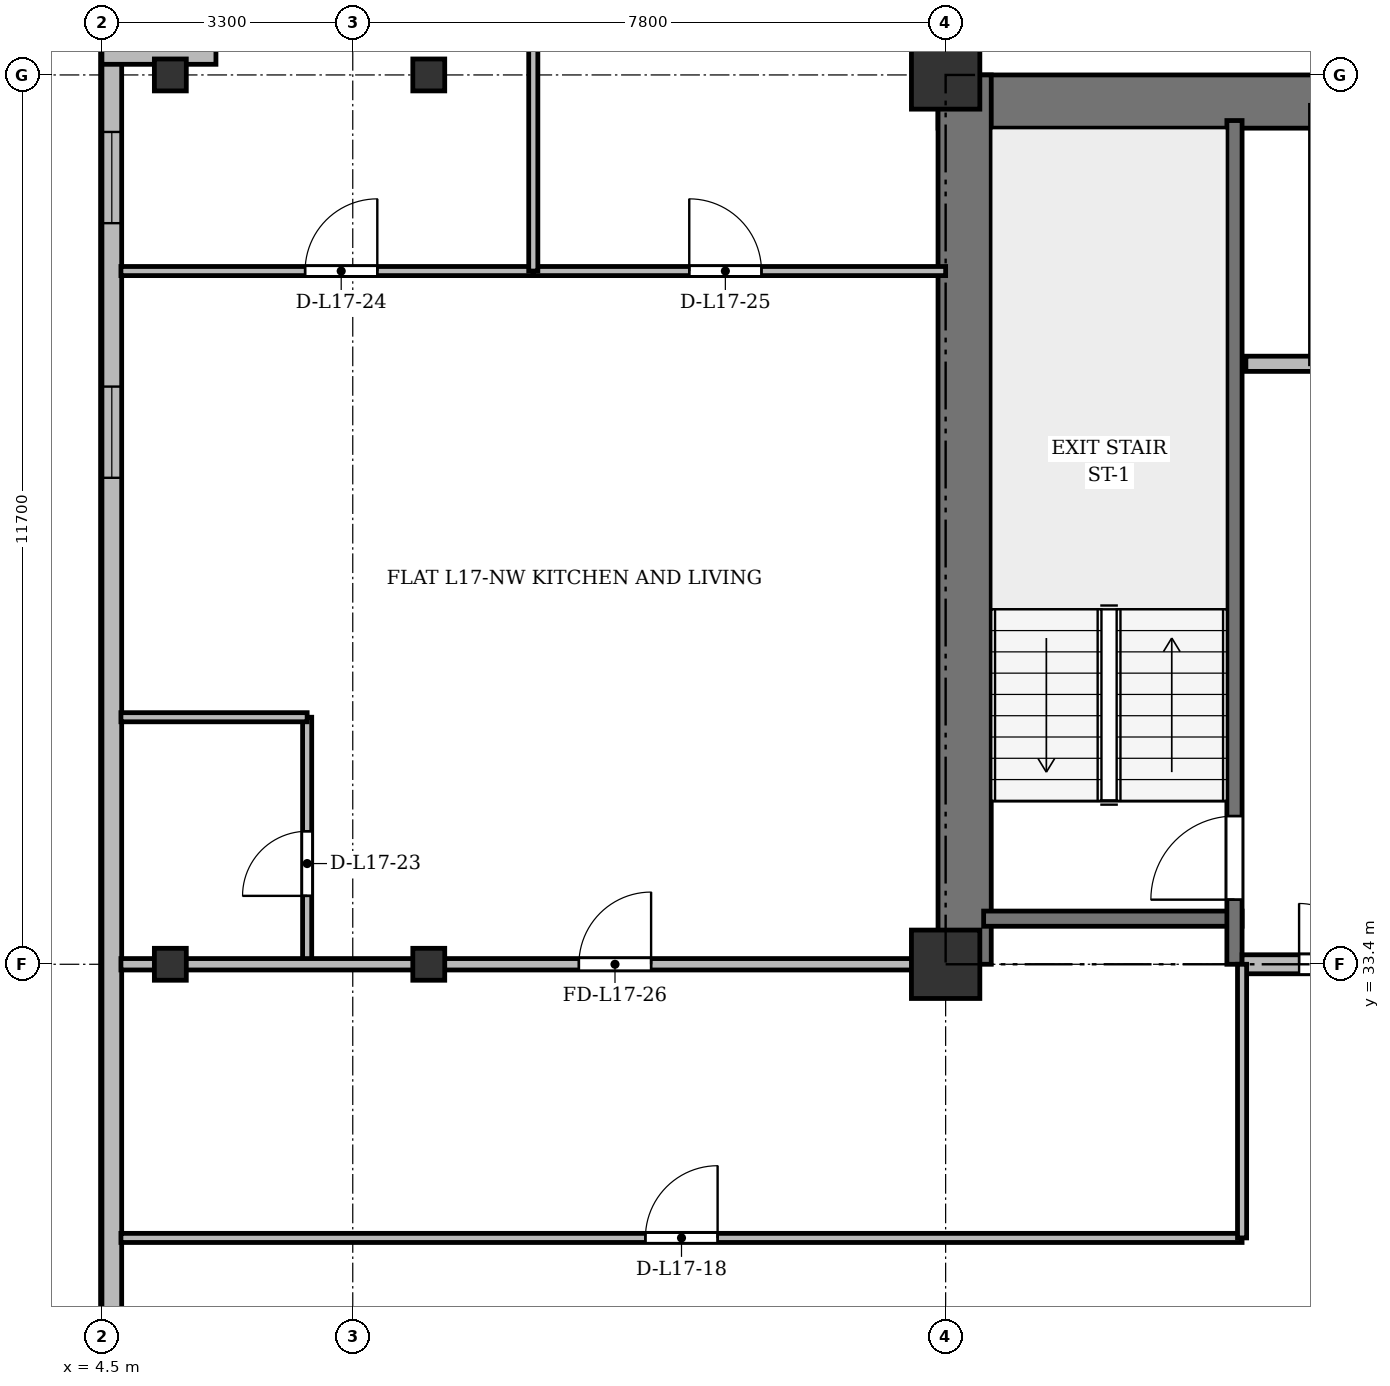
"""IFC4 building model, lengths in metres.
Left out: names, types, materials, properties, quantities, classifications, styles, units other than length and angle.
Written with IfcOpenShell. Run it as: python <this file> out.ifc"""

import sys

from ifc_helpers import new_model, si_unit, direction, frame, frame_2d, origin, origin_2d, place, context, subcontext, project, spatial, rectangle, i_section, extrude, source, transform, mapped, element, fill, save


model = new_model("IFC4")
c1 = context("Model", 3, precision=1e-05, world=origin(), true_north=direction((0.0, 1.0)))
c2 = subcontext(c1, "Body", "Model", "MODEL_VIEW")
j1 = project(units=[si_unit("LENGTHUNIT", "METRE"), si_unit("PLANEANGLEUNIT", "RADIAN")], contexts=[c1])
p1 = place(None, origin())
s1 = spatial("IfcSite", under=j1, at=p1, CompositionType="ELEMENT")
p2 = place(p1, origin())
s2 = spatial("IfcBuilding", under=s1, at=p2, CompositionType="ELEMENT")
p3 = place(p2, frame((0.0, 0.0, 66.7)))
s3 = spatial("IfcBuildingStorey", under=s2, at=p3, CompositionType="ELEMENT", Elevation=66.7)
m1 = source(origin(), c2, "Body", "SweptSolid", [
    extrude(i_section(OverallWidth=0.42, OverallDepth=0.42, WebThickness=0.026, FlangeThickness=0.04, at=origin_2d()), origin(), (0.0, 0.0, 1.0), 3.6),
])
for number, where, z_axis, x_axis in (
    (1, (5.4, 33.4, 0.0), (0.0, 0.0, 1.0), (1.0, 0.0, 0.0)),
    (2, (5.4, 45.1, 0.0), (0.0, 0.0, 1.0), (1.0, 0.0, 0.0)),
    (3, (8.8, 33.4, 0.0), (0.0, 0.0, 1.0), (1.0, 0.0, 0.0)),
    (4, (8.8, 45.1, 0.0), (0.0, 0.0, 1.0), (1.0, 0.0, 0.0)),
):
    element("IfcColumn", number, at=place(p3, frame(where, z_axis=z_axis, x_axis=x_axis)), inside=s3, PredefinedType="COLUMN", context=c2, shape_type="MappedRepresentation", body=[
        mapped(m1, transform((0.0, 0.0, 0.0), x_axis=(1.0, 0.0, 0.0), y_axis=(0.0, 1.0, 0.0), z_axis=(0.0, 0.0, 1.0), scale=1.0)),
    ])
m2 = source(origin(), c2, "Body", "SweptSolid", [
    extrude(rectangle(XDim=0.9, YDim=0.9, at=origin_2d()), origin(), (0.0, 0.0, 1.0), 3.6),
])
for number, where, z_axis, x_axis in (
    (5, (15.6, 33.4, 0.0), (0.0, 0.0, 1.0), (1.0, 0.0, 0.0)),
    (6, (15.6, 45.1, 0.0), (0.0, 0.0, 1.0), (1.0, 0.0, 0.0)),
):
    element("IfcColumn", number, at=place(p3, frame(where, z_axis=z_axis, x_axis=x_axis)), inside=s3, PredefinedType="COLUMN", context=c2, shape_type="MappedRepresentation", body=[
        mapped(m2, transform((0.0, 0.0, 0.0), x_axis=(1.0, 0.0, 0.0), y_axis=(0.0, 1.0, 0.0), z_axis=(0.0, 0.0, 1.0), scale=1.0)),
    ])
p4 = place(p3, frame((4.63, 5.9, 0.0), z_axis=(0.0, 0.0, 1.0), x_axis=(0.0, 1.0, 0.0)))
e7 = element("IfcWall", 7, at=p4, inside=s3, PredefinedType="SOLIDWALL", context=c2, shape_type="SweptSolid", body=[
    extrude(rectangle(XDim=39.6, YDim=0.26, at=frame_2d((19.8, 0.0))), origin(), (0.0, 0.0, 1.0), 3.34),
])
p5 = place(p4, frame((1.45, 0.0, 0.92)))
e8 = element("IfcOpeningElement", 8, at=p5, cuts=e7, PredefinedType="OPENING", context=c2, shape_type="SweptSolid", body=[
    extrude(rectangle(XDim=1.2, YDim=1.65, at=frame_2d((0.6, 0.825))), frame((0.0, 0.14, 0.0), z_axis=(0.0, -1.0, 0.0), x_axis=(1.0, 0.0, 0.0)), (0.0, 0.0, 1.0), 0.28),
])
p6 = place(p4, frame((4.3, 0.0, 0.92)))
e9 = element("IfcOpeningElement", 9, at=p6, cuts=e7, PredefinedType="OPENING", context=c2, shape_type="SweptSolid", body=[
    extrude(rectangle(XDim=2.4, YDim=2.1, at=frame_2d((1.2, 1.05))), frame((0.0, 0.14, 0.0), z_axis=(0.0, -1.0, 0.0), x_axis=(1.0, 0.0, 0.0)), (0.0, 0.0, 1.0), 0.28),
])
p7 = place(p4, frame((8.5, 0.0, 0.92)))
e10 = element("IfcOpeningElement", 10, at=p7, cuts=e7, PredefinedType="OPENING", context=c2, shape_type="SweptSolid", body=[
    extrude(rectangle(XDim=2.4, YDim=2.1, at=frame_2d((1.2, 1.05))), frame((0.0, 0.14, 0.0), z_axis=(0.0, -1.0, 0.0), x_axis=(1.0, 0.0, 0.0)), (0.0, 0.0, 1.0), 0.28),
])
p8 = place(p4, frame((33.9, 0.0, 0.92)))
e11 = element("IfcOpeningElement", 11, at=p8, cuts=e7, PredefinedType="OPENING", context=c2, shape_type="SweptSolid", body=[
    extrude(rectangle(XDim=1.2, YDim=1.65, at=frame_2d((0.6, 0.825))), frame((0.0, 0.14, 0.0), z_axis=(0.0, -1.0, 0.0), x_axis=(1.0, 0.0, 0.0)), (0.0, 0.0, 1.0), 0.28),
])
p9 = place(p4, frame((37.25, 0.0, 0.92)))
e12 = element("IfcOpeningElement", 12, at=p9, cuts=e7, PredefinedType="OPENING", context=c2, shape_type="SweptSolid", body=[
    extrude(rectangle(XDim=1.2, YDim=1.65, at=frame_2d((0.6, 0.825))), frame((0.0, 0.14, 0.0), z_axis=(0.0, -1.0, 0.0), x_axis=(1.0, 0.0, 0.0)), (0.0, 0.0, 1.0), 0.28),
])
p10 = place(p3, frame((4.5, 45.37, 0.0), z_axis=(0.0, 0.0, 1.0), x_axis=(1.0, 0.0, 0.0)))
e13 = element("IfcWall", 13, at=p10, inside=s3, PredefinedType="SOLIDWALL", context=c2, shape_type="SweptSolid", body=[
    extrude(rectangle(XDim=1.5, YDim=0.26, at=frame_2d((0.75, 0.0))), origin(), (0.0, 0.0, 1.0), 2.69),
])
p11 = place(p3, frame((15.5, 44.75, 0.0), z_axis=(0.0, 0.0, 1.0), x_axis=(1.0, 0.0, 0.0)))
e14 = element("IfcWall", 14, at=p11, inside=s3, PredefinedType="SHEAR", context=c2, shape_type="SweptSolid", body=[
    extrude(rectangle(XDim=43.4, YDim=0.7, at=frame_2d((21.7, 0.0))), origin(), (0.0, 0.0, 1.0), 3.34),
])
p12 = place(p3, frame((15.85, 33.4, 0.0), z_axis=(0.0, 0.0, 1.0), x_axis=(0.0, 1.0, 0.0)))
e15 = element("IfcWall", 15, at=p12, inside=s3, PredefinedType="SHEAR", context=c2, shape_type="SweptSolid", body=[
    extrude(rectangle(XDim=11.7, YDim=0.7, at=frame_2d((5.85, 0.0))), origin(), (0.0, 0.0, 1.0), 3.34),
])
p13 = place(p3, frame((16.1, 34.0, 0.0), z_axis=(0.0, 0.0, 1.0), x_axis=(1.0, 0.0, 0.0)))
e16 = element("IfcWall", 16, at=p13, inside=s3, PredefinedType="SHEAR", context=c2, shape_type="SweptSolid", body=[
    extrude(rectangle(XDim=3.4, YDim=0.2, at=frame_2d((1.7, 0.0))), origin(), (0.0, 0.0, 1.0), 3.34),
])
p14 = place(p3, frame((19.4, 33.4, 0.0), z_axis=(0.0, 0.0, 1.0), x_axis=(0.0, 1.0, 0.0)))
e17 = element("IfcWall", 17, at=p14, inside=s3, PredefinedType="SHEAR", context=c2, shape_type="SweptSolid", body=[
    extrude(rectangle(XDim=11.1, YDim=0.2, at=frame_2d((5.55, 0.0))), origin(), (0.0, 0.0, 1.0), 3.34),
])
p15 = place(p14, frame((0.85, 0.0, 0.0)))
e18 = element("IfcOpeningElement", 18, at=p15, cuts=e17, PredefinedType="OPENING", context=c2, shape_type="SweptSolid", body=[
    extrude(rectangle(XDim=1.1, YDim=2.15, at=frame_2d((0.55, 1.075))), frame((0.0, 0.11, 0.0), z_axis=(0.0, -1.0, 0.0), x_axis=(1.0, 0.0, 0.0)), (0.0, 0.0, 1.0), 0.22),
])
p16 = place(p3, frame((19.55, 41.3, 0.0), z_axis=(0.0, 0.0, 1.0), x_axis=(1.0, 0.0, 0.0)))
e19 = element("IfcWall", 19, at=p16, inside=s3, PredefinedType="SOLIDWALL", context=c2, shape_type="SweptSolid", body=[
    extrude(rectangle(XDim=6.75, YDim=0.2, at=frame_2d((3.375, 0.0))), origin(), (0.0, 0.0, 1.0), 3.34),
])
p17 = place(p16, frame((1.7, 0.0, 0.0)))
e20 = element("IfcOpeningElement", 20, at=p17, cuts=e19, PredefinedType="OPENING", context=c2, shape_type="SweptSolid", body=[
    extrude(rectangle(XDim=1.1, YDim=2.15, at=frame_2d((0.55, 1.075))), frame((0.0, 0.11, 0.0), z_axis=(0.0, -1.0, 0.0), x_axis=(1.0, 0.0, 0.0)), (0.0, 0.0, 1.0), 0.22),
])
p18 = place(p16, frame((4.4, 0.0, 0.0)))
e21 = element("IfcOpeningElement", 21, at=p18, cuts=e19, PredefinedType="OPENING", context=c2, shape_type="SweptSolid", body=[
    extrude(rectangle(XDim=1.1, YDim=2.15, at=frame_2d((0.55, 1.075))), frame((0.0, 0.11, 0.0), z_axis=(0.0, -1.0, 0.0), x_axis=(1.0, 0.0, 0.0)), (0.0, 0.0, 1.0), 0.22),
])
p19 = place(p3, frame((19.5, 33.4, 0.0), z_axis=(0.0, 0.0, 1.0), x_axis=(1.0, 0.0, 0.0)))
e22 = element("IfcWall", 22, at=p19, inside=s3, PredefinedType="PARTITIONING", context=c2, shape_type="SweptSolid", body=[
    extrude(rectangle(XDim=6.8, YDim=0.25, at=frame_2d((3.4, 0.0))), origin(), (0.0, 0.0, 1.0), 2.69),
])
p20 = place(p19, frame((0.75, 0.0, 0.0)))
e23 = element("IfcOpeningElement", 23, at=p20, cuts=e22, PredefinedType="OPENING", context=c2, shape_type="SweptSolid", body=[
    extrude(rectangle(XDim=1.6, YDim=2.2, at=frame_2d((0.8, 1.1))), frame((0.0, 0.135, 0.0), z_axis=(0.0, -1.0, 0.0), x_axis=(1.0, 0.0, 0.0)), (0.0, 0.0, 1.0), 0.27),
])
p21 = place(p3, frame((4.75, 29.8, 0.0), z_axis=(0.0, 0.0, 1.0), x_axis=(1.0, 0.0, 0.0)))
e24 = element("IfcWall", 24, at=p21, inside=s3, PredefinedType="PARTITIONING", context=c2, shape_type="SweptSolid", body=[
    extrude(rectangle(XDim=14.75, YDim=0.12, at=frame_2d((7.375, 0.0))), origin(), (0.0, 0.0, 1.0), 2.752),
])
p22 = place(p21, frame((6.9, 0.0, 0.0)))
e25 = element("IfcOpeningElement", 25, at=p22, cuts=e24, PredefinedType="OPENING", context=c2, shape_type="SweptSolid", body=[
    extrude(rectangle(XDim=0.95, YDim=2.15, at=frame_2d((0.475, 1.075))), frame((0.0, 0.07, 0.0), z_axis=(0.0, -1.0, 0.0), x_axis=(1.0, 0.0, 0.0)), (0.0, 0.0, 1.0), 0.14),
])
p23 = place(p3, frame((19.5, 29.8, 0.0), z_axis=(0.0, 0.0, 1.0), x_axis=(0.0, 1.0, 0.0)))
e26 = element("IfcWall", 26, at=p23, inside=s3, PredefinedType="PARTITIONING", context=c2, shape_type="SweptSolid", body=[
    extrude(rectangle(XDim=3.6, YDim=0.12, at=frame_2d((1.8, 0.0))), origin(), (0.0, 0.0, 1.0), 2.69),
])
p24 = place(p3, frame((7.2, 33.4, 0.0), z_axis=(0.0, 0.0, 1.0), x_axis=(0.0, 1.0, 0.0)))
e27 = element("IfcWall", 27, at=p24, inside=s3, PredefinedType="PARTITIONING", context=c2, shape_type="SweptSolid", body=[
    extrude(rectangle(XDim=3.25, YDim=0.12, at=frame_2d((1.625, 0.0))), origin(), (0.0, 0.0, 1.0), 2.69),
])
p25 = place(p24, frame((0.9, 0.0, 0.0)))
e28 = element("IfcOpeningElement", 28, at=p25, cuts=e27, PredefinedType="OPENING", context=c2, shape_type="SweptSolid", body=[
    extrude(rectangle(XDim=0.85, YDim=2.1, at=frame_2d((0.425, 1.05))), frame((0.0, 0.07, 0.0), z_axis=(0.0, -1.0, 0.0), x_axis=(1.0, 0.0, 0.0)), (0.0, 0.0, 1.0), 0.14),
])
p26 = place(p3, frame((4.75, 36.65, 0.0), z_axis=(0.0, 0.0, 1.0), x_axis=(1.0, 0.0, 0.0)))
e29 = element("IfcWall", 29, at=p26, inside=s3, PredefinedType="PARTITIONING", context=c2, shape_type="SweptSolid", body=[
    extrude(rectangle(XDim=2.45, YDim=0.12, at=frame_2d((1.225, 0.0))), origin(), (0.0, 0.0, 1.0), 2.752),
])
p27 = place(p3, frame((4.75, 42.52, 0.0), z_axis=(0.0, 0.0, 1.0), x_axis=(1.0, 0.0, 0.0)))
e30 = element("IfcWall", 30, at=p27, inside=s3, PredefinedType="PARTITIONING", context=c2, shape_type="SweptSolid", body=[
    extrude(rectangle(XDim=5.425, YDim=0.12, at=frame_2d((2.712, 0.0))), origin(), (0.0, 0.0, 1.0), 2.752),
])
p28 = place(p27, frame((2.423, 0.0, 0.0)))
e31 = element("IfcOpeningElement", 31, at=p28, cuts=e30, PredefinedType="OPENING", context=c2, shape_type="SweptSolid", body=[
    extrude(rectangle(XDim=0.95, YDim=2.15, at=frame_2d((0.475, 1.075))), frame((0.0, 0.07, 0.0), z_axis=(0.0, -1.0, 0.0), x_axis=(1.0, 0.0, 0.0)), (0.0, 0.0, 1.0), 0.14),
])
p29 = place(p3, frame((10.175, 42.52, 0.0), z_axis=(0.0, 0.0, 1.0), x_axis=(1.0, 0.0, 0.0)))
e32 = element("IfcWall", 32, at=p29, inside=s3, PredefinedType="PARTITIONING", context=c2, shape_type="SweptSolid", body=[
    extrude(rectangle(XDim=5.425, YDim=0.12, at=frame_2d((2.712, 0.0))), origin(), (0.0, 0.0, 1.0), 2.752),
])
p30 = place(p29, frame((2.052, 0.0, 0.0)))
e33 = element("IfcOpeningElement", 33, at=p30, cuts=e32, PredefinedType="OPENING", context=c2, shape_type="SweptSolid", body=[
    extrude(rectangle(XDim=0.95, YDim=2.15, at=frame_2d((0.475, 1.075))), frame((0.0, 0.07, 0.0), z_axis=(0.0, -1.0, 0.0), x_axis=(1.0, 0.0, 0.0)), (0.0, 0.0, 1.0), 0.14),
])
p31 = place(p3, frame((10.175, 42.52, 0.0), z_axis=(0.0, 0.0, 1.0), x_axis=(0.0, 1.0, 0.0)))
e34 = element("IfcWall", 34, at=p31, inside=s3, PredefinedType="PARTITIONING", context=c2, shape_type="SweptSolid", body=[
    extrude(rectangle(XDim=5.72, YDim=0.12, at=frame_2d((2.86, 0.0))), origin(), (0.0, 0.0, 1.0), 2.69),
])
p32 = place(p3, frame((4.75, 33.4, 0.0), z_axis=(0.0, 0.0, 1.0), x_axis=(1.0, 0.0, 0.0)))
e35 = element("IfcWall", 35, at=p32, inside=s3, PredefinedType="PARTITIONING", context=c2, shape_type="SweptSolid", body=[
    extrude(rectangle(XDim=10.85, YDim=0.15, at=frame_2d((5.425, 0.0))), origin(), (0.0, 0.0, 1.0), 2.69),
])
p33 = place(p32, frame((6.025, 0.0, 0.0)))
e36 = element("IfcOpeningElement", 36, at=p33, cuts=e35, PredefinedType="OPENING", context=c2, shape_type="SweptSolid", body=[
    extrude(rectangle(XDim=0.95, YDim=2.15, at=frame_2d((0.475, 1.075))), frame((0.0, 0.085, 0.0), z_axis=(0.0, -1.0, 0.0), x_axis=(1.0, 0.0, 0.0)), (0.0, 0.0, 1.0), 0.17),
])
p34 = place(p3, frame((15.6, 44.75, 0.0), z_axis=(0.0, 0.0, 1.0), x_axis=(0.0, 1.0, 0.0)))
e37 = element("IfcWall", 37, at=p34, inside=s3, PredefinedType="PARTITIONING", context=c2, shape_type="SweptSolid", body=[
    extrude(rectangle(XDim=3.61, YDim=0.15, at=frame_2d((1.805, 0.0))), origin(), (0.0, 0.0, 1.0), 2.752),
])
p35 = place(p34, frame((1.1, 0.0, 0.0)))
e38 = element("IfcOpeningElement", 38, at=p35, cuts=e37, PredefinedType="OPENING", context=c2, shape_type="SweptSolid", body=[
    extrude(rectangle(XDim=0.95, YDim=2.15, at=frame_2d((0.475, 1.075))), frame((0.0, 0.085, 0.0), z_axis=(0.0, -1.0, 0.0), x_axis=(1.0, 0.0, 0.0)), (0.0, 0.0, 1.0), 0.17),
])
m3 = source(origin(), c2, "Body", "SweptSolid", [
    extrude(rectangle(XDim=1.2, YDim=1.65, at=frame_2d((0.6, 0.825))), frame((0.0, 0.03, 0.0), z_axis=(0.0, -1.0, 0.0), x_axis=(1.0, 0.0, 0.0)), (0.0, 0.0, 1.0), 0.06),
])
p36 = place(p8, origin())
e39 = element("IfcWindow", 39, at=p36, inside=s3, PartitioningType="SINGLE_PANEL", PredefinedType="WINDOW", context=c2, shape_type="MappedRepresentation", body=[
    mapped(m3, transform((0.0, 0.0, 0.0), x_axis=(1.0, 0.0, 0.0), y_axis=(0.0, 1.0, 0.0), z_axis=(0.0, 0.0, 1.0), scale=1.0)),
])
fill(e11, e39)
p37 = place(p9, origin())
e40 = element("IfcWindow", 40, at=p37, inside=s3, PartitioningType="SINGLE_PANEL", PredefinedType="WINDOW", context=c2, shape_type="MappedRepresentation", body=[
    mapped(m3, transform((0.0, 0.0, 0.0), x_axis=(1.0, 0.0, 0.0), y_axis=(0.0, 1.0, 0.0), z_axis=(0.0, 0.0, 1.0), scale=1.0)),
])
fill(e12, e40)
m4 = source(origin(), c2, "Body", "SweptSolid", [
    extrude(rectangle(XDim=1.1, YDim=2.15, at=frame_2d((0.55, 1.075))), frame((0.0, 0.025, 0.0), z_axis=(0.0, -1.0, 0.0), x_axis=(1.0, 0.0, 0.0)), (0.0, 0.0, 1.0), 0.05),
])
p38 = place(p15, origin())
e41 = element("IfcDoor", 41, at=p38, inside=s3, OperationType="SINGLE_SWING_LEFT", PredefinedType="DOOR", context=c2, shape_type="MappedRepresentation", body=[
    mapped(m4, transform((0.0, 0.0, 0.0), x_axis=(1.0, 0.0, 0.0), y_axis=(0.0, 1.0, 0.0), z_axis=(0.0, 0.0, 1.0), scale=1.0)),
])
fill(e18, e41)
m5 = source(origin(), c2, "Body", "SweptSolid", [
    extrude(rectangle(XDim=1.6, YDim=2.2, at=frame_2d((0.8, 1.1))), frame((0.0, 0.025, 0.0), z_axis=(0.0, -1.0, 0.0), x_axis=(1.0, 0.0, 0.0)), (0.0, 0.0, 1.0), 0.05),
])
p39 = place(p20, origin())
e42 = element("IfcDoor", 42, at=p39, inside=s3, OperationType="DOUBLE_DOOR_SINGLE_SWING", PredefinedType="DOOR", context=c2, shape_type="MappedRepresentation", body=[
    mapped(m5, transform((0.0, 0.0, 0.0), x_axis=(1.0, 0.0, 0.0), y_axis=(0.0, 1.0, 0.0), z_axis=(0.0, 0.0, 1.0), scale=1.0)),
])
fill(e23, e42)
m6 = source(origin(), c2, "Body", "SweptSolid", [
    extrude(rectangle(XDim=0.95, YDim=2.15, at=frame_2d((0.475, 1.075))), frame((0.0, 0.025, 0.0), z_axis=(0.0, -1.0, 0.0), x_axis=(1.0, 0.0, 0.0)), (0.0, 0.0, 1.0), 0.05),
])
p40 = place(p22, origin())
e43 = element("IfcDoor", 43, at=p40, inside=s3, OperationType="SINGLE_SWING_RIGHT", PredefinedType="DOOR", context=c2, shape_type="MappedRepresentation", body=[
    mapped(m6, transform((0.0, 0.0, 0.0), x_axis=(1.0, 0.0, 0.0), y_axis=(0.0, 1.0, 0.0), z_axis=(0.0, 0.0, 1.0), scale=1.0)),
])
fill(e25, e43)
m7 = source(origin(), c2, "Body", "SweptSolid", [
    extrude(rectangle(XDim=0.85, YDim=2.1, at=frame_2d((0.425, 1.05))), frame((0.0, 0.025, 0.0), z_axis=(0.0, -1.0, 0.0), x_axis=(1.0, 0.0, 0.0)), (0.0, 0.0, 1.0), 0.05),
])
p41 = place(p25, origin())
e44 = element("IfcDoor", 44, at=p41, inside=s3, OperationType="SINGLE_SWING_LEFT", PredefinedType="DOOR", context=c2, shape_type="MappedRepresentation", body=[
    mapped(m7, transform((0.0, 0.0, 0.0), x_axis=(1.0, 0.0, 0.0), y_axis=(0.0, 1.0, 0.0), z_axis=(0.0, 0.0, 1.0), scale=1.0)),
])
fill(e28, e44)
p42 = place(p28, origin())
e45 = element("IfcDoor", 45, at=p42, inside=s3, OperationType="SINGLE_SWING_RIGHT", PredefinedType="DOOR", context=c2, shape_type="MappedRepresentation", body=[
    mapped(m6, transform((0.0, 0.0, 0.0), x_axis=(1.0, 0.0, 0.0), y_axis=(0.0, 1.0, 0.0), z_axis=(0.0, 0.0, 1.0), scale=1.0)),
])
fill(e31, e45)
p43 = place(p30, origin())
e46 = element("IfcDoor", 46, at=p43, inside=s3, OperationType="SINGLE_SWING_LEFT", PredefinedType="DOOR", context=c2, shape_type="MappedRepresentation", body=[
    mapped(m6, transform((0.0, 0.0, 0.0), x_axis=(1.0, 0.0, 0.0), y_axis=(0.0, 1.0, 0.0), z_axis=(0.0, 0.0, 1.0), scale=1.0)),
])
fill(e33, e46)
p44 = place(p33, origin())
e47 = element("IfcDoor", 47, at=p44, inside=s3, OperationType="SINGLE_SWING_RIGHT", PredefinedType="DOOR", context=c2, shape_type="MappedRepresentation", body=[
    mapped(m6, transform((0.0, 0.0, 0.0), x_axis=(1.0, 0.0, 0.0), y_axis=(0.0, 1.0, 0.0), z_axis=(0.0, 0.0, 1.0), scale=1.0)),
])
fill(e36, e47)
save(model, sys.argv[1])
